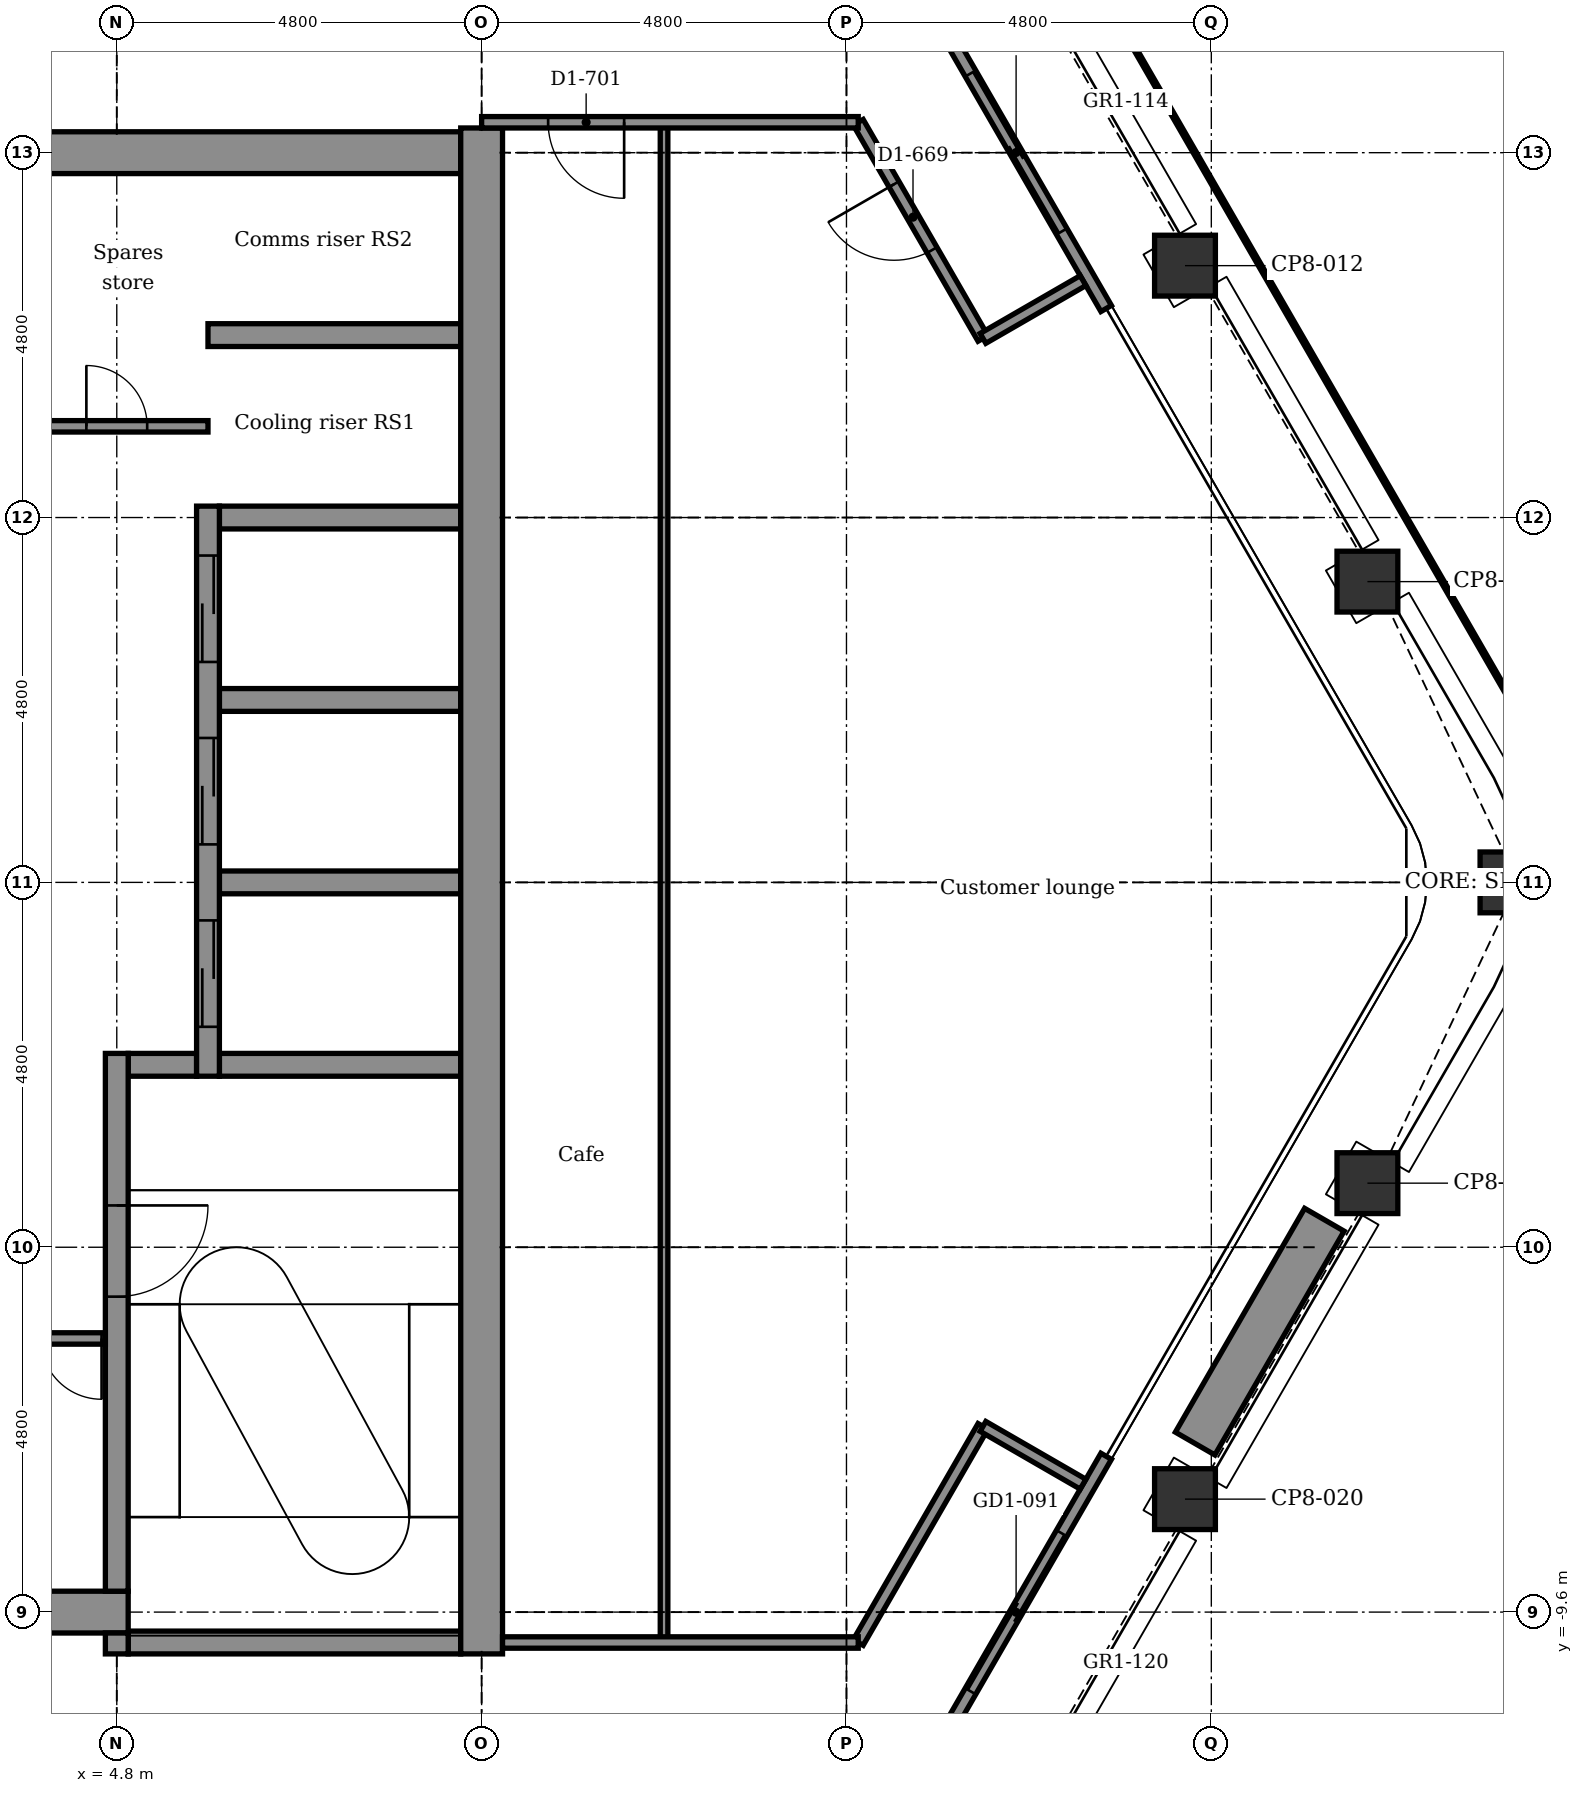
"""IFC4 building model, lengths in metres.
Left out: names, types, materials, properties, quantities, classifications, styles, units other than length and angle.
Written with IfcOpenShell. Run it as: python <this file> out.ifc"""

import sys

from ifc_helpers import new_model, si_unit, direction, frame, frame_2d, origin, origin_2d, place, context, subcontext, project, spatial, rectangle, extrude, element, fill, save


model = new_model("IFC4")
c1 = context("Model", 3, precision=1e-05, world=origin(), true_north=direction((0.0, 1.0)))
c2 = subcontext(c1, "Body", "Model", "MODEL_VIEW")
j1 = project(units=[si_unit("LENGTHUNIT", "METRE"), si_unit("PLANEANGLEUNIT", "RADIAN")], contexts=[c1])
p1 = place(None, origin())
s1 = spatial("IfcSite", under=j1, at=p1, CompositionType="ELEMENT")
p2 = place(p1, origin())
s2 = spatial("IfcBuilding", under=s1, at=p2, CompositionType="ELEMENT")
p3 = place(p2, frame((0.0, 0.0, 254.0)))
s3 = spatial("IfcBuildingStorey", under=s2, at=p3, CompositionType="ELEMENT", Elevation=254.0)
for number, where, z_axis, x_axis in (
    (1, (18.854, 8.114, -0.15), (0.0, 0.0, 1.0), (0.866, 0.5, 0.0)),
    (2, (21.254, 3.957, -0.15), (0.0, 0.0, 1.0), (0.866, 0.5, 0.0)),
    (3, (23.136, 0.0, -0.15), (0.0, 0.0, 1.0), (1.0, 0.0, 0.0)),
    (4, (21.254, -3.957, -0.15), (0.0, 0.0, 1.0), (0.5, 0.866, 0.0)),
    (5, (18.854, -8.114, -0.15), (0.0, 0.0, 1.0), (0.5, 0.866, 0.0)),
):
    element("IfcColumn", number, at=place(p3, frame(where, z_axis=z_axis, x_axis=x_axis)), inside=s3, PredefinedType="COLUMN", context=c2, shape_type="SweptSolid", body=[
        extrude(rectangle(XDim=0.8, YDim=0.8, at=origin_2d()), origin(), (0.0, 0.0, 1.0), 3.9),
    ])
p4 = place(p3, frame((4.95, -10.0, -0.15), z_axis=(0.0, 0.0, 1.0), x_axis=(1.0, 0.0, 0.0)))
e6 = element("IfcWall", 6, at=p4, inside=s3, PredefinedType="STANDARD", context=c2, shape_type="SweptSolid", body=[
    extrude(rectangle(XDim=4.375, YDim=0.3, at=frame_2d((2.188, 0.0))), origin(), (0.0, 0.0, 1.0), 3.9),
])
p5 = place(p3, frame((-5.25, -9.6, -0.15), z_axis=(0.0, 0.0, 1.0), x_axis=(1.0, 0.0, 0.0)))
e7 = element("IfcWall", 7, at=p5, inside=s3, PredefinedType="SHEAR", context=c2, shape_type="SweptSolid", body=[
    extrude(rectangle(XDim=10.2, YDim=0.55, at=frame_2d((5.1, 0.0))), origin(), (0.0, 0.0, 1.0), 3.9),
])
p6 = place(p5, frame((0.6, 0.0, 0.15)))
e8 = element("IfcOpeningElement", 8, at=p6, cuts=e7, PredefinedType="OPENING", context=c2, shape_type="SweptSolid", body=[
    extrude(rectangle(XDim=0.9, YDim=2.1, at=frame_2d((0.45, 1.05))), frame((0.0, 0.285, 0.0), z_axis=(0.0, -1.0, 0.0), x_axis=(1.0, 0.0, 0.0)), (0.0, 0.0, 1.0), 0.57),
])
p7 = place(p3, frame((4.95, -2.4, -0.15), z_axis=(0.0, 0.0, 1.0), x_axis=(1.0, 0.0, 0.0)))
e9 = element("IfcWall", 9, at=p7, inside=s3, PredefinedType="STANDARD", context=c2, shape_type="SweptSolid", body=[
    extrude(rectangle(XDim=0.9, YDim=0.3, at=frame_2d((0.45, 0.0))), origin(), (0.0, 0.0, 1.0), 3.9),
])
for number, where, z_axis, x_axis in (
    (10, (6.15, -2.4, -0.15), (0.0, 0.0, 1.0), (1.0, 0.0, 0.0)),
    (11, (6.15, 0.0, -0.15), (0.0, 0.0, 1.0), (1.0, 0.0, 0.0)),
    (12, (6.15, 2.4, -0.15), (0.0, 0.0, 1.0), (1.0, 0.0, 0.0)),
    (13, (6.15, 4.8, -0.15), (0.0, 0.0, 1.0), (1.0, 0.0, 0.0)),
):
    element("IfcWall", number, at=place(p3, frame(where, z_axis=z_axis, x_axis=x_axis)), inside=s3, PredefinedType="STANDARD", context=c2, shape_type="SweptSolid", body=[
        extrude(rectangle(XDim=3.175, YDim=0.3, at=frame_2d((1.587, 0.0))), origin(), (0.0, 0.0, 1.0), 3.9),
    ])
p8 = place(p3, frame((6.0, 7.2, -0.15), z_axis=(0.0, 0.0, 1.0), x_axis=(1.0, 0.0, 0.0)))
e14 = element("IfcWall", 14, at=p8, inside=s3, PredefinedType="STANDARD", context=c2, shape_type="SweptSolid", body=[
    extrude(rectangle(XDim=3.325, YDim=0.3, at=frame_2d((1.663, 0.0))), origin(), (0.0, 0.0, 1.0), 3.9),
])
p9 = place(p3, frame((-5.25, 9.6, -0.15), z_axis=(0.0, 0.0, 1.0), x_axis=(1.0, 0.0, 0.0)))
e15 = element("IfcWall", 15, at=p9, inside=s3, PredefinedType="SHEAR", context=c2, shape_type="SweptSolid", body=[
    extrude(rectangle(XDim=14.575, YDim=0.55, at=frame_2d((7.288, 0.0))), origin(), (0.0, 0.0, 1.0), 3.9),
])
p10 = place(p9, frame((0.6, 0.0, 0.15)))
e16 = element("IfcOpeningElement", 16, at=p10, cuts=e15, PredefinedType="OPENING", context=c2, shape_type="SweptSolid", body=[
    extrude(rectangle(XDim=0.9, YDim=2.1, at=frame_2d((0.45, 1.05))), frame((0.0, 0.285, 0.0), z_axis=(0.0, -1.0, 0.0), x_axis=(1.0, 0.0, 0.0)), (0.0, 0.0, 1.0), 0.57),
])
p11 = place(p3, frame((4.8, -10.15, -0.15), z_axis=(0.0, 0.0, 1.0), x_axis=(0.0, 1.0, 0.0)))
e17 = element("IfcWall", 17, at=p11, inside=s3, PredefinedType="STANDARD", context=c2, shape_type="SweptSolid", body=[
    extrude(rectangle(XDim=0.275, YDim=0.3, at=frame_2d((0.137, 0.0))), origin(), (0.0, 0.0, 1.0), 3.9),
])
p12 = place(p3, frame((4.8, -9.325, -0.15), z_axis=(0.0, 0.0, 1.0), x_axis=(0.0, 1.0, 0.0)))
e18 = element("IfcWall", 18, at=p12, inside=s3, PredefinedType="STANDARD", context=c2, shape_type="SweptSolid", body=[
    extrude(rectangle(XDim=7.075, YDim=0.3, at=frame_2d((3.538, 0.0))), origin(), (0.0, 0.0, 1.0), 3.9),
])
p13 = place(p12, frame((3.875, 0.0, 0.15)))
e19 = element("IfcOpeningElement", 19, at=p13, cuts=e18, PredefinedType="OPENING", context=c2, shape_type="SweptSolid", body=[
    extrude(rectangle(XDim=1.2, YDim=2.1, at=frame_2d((0.6, 1.05))), frame((0.0, 0.16, 0.0), z_axis=(0.0, -1.0, 0.0), x_axis=(1.0, 0.0, 0.0)), (0.0, 0.0, 1.0), 0.32),
])
p14 = place(p3, frame((6.0, -2.55, -0.15), z_axis=(0.0, 0.0, 1.0), x_axis=(0.0, 1.0, 0.0)))
e20 = element("IfcWall", 20, at=p14, inside=s3, PredefinedType="STANDARD", context=c2, shape_type="SweptSolid", body=[
    extrude(rectangle(XDim=7.5, YDim=0.3, at=frame_2d((3.75, 0.0))), origin(), (0.0, 0.0, 1.0), 3.9),
])
p15 = place(p14, frame((0.65, 0.0, 0.15)))
e21 = element("IfcOpeningElement", 21, at=p15, cuts=e20, PredefinedType="OPENING", context=c2, shape_type="SweptSolid", body=[
    extrude(rectangle(XDim=1.4, YDim=2.1, at=frame_2d((0.7, 1.05))), frame((0.0, 0.16, 0.0), z_axis=(0.0, -1.0, 0.0), x_axis=(1.0, 0.0, 0.0)), (0.0, 0.0, 1.0), 0.32),
])
p16 = place(p14, frame((3.05, 0.0, 0.15)))
e22 = element("IfcOpeningElement", 22, at=p16, cuts=e20, PredefinedType="OPENING", context=c2, shape_type="SweptSolid", body=[
    extrude(rectangle(XDim=1.4, YDim=2.1, at=frame_2d((0.7, 1.05))), frame((0.0, 0.16, 0.0), z_axis=(0.0, -1.0, 0.0), x_axis=(1.0, 0.0, 0.0)), (0.0, 0.0, 1.0), 0.32),
])
p17 = place(p14, frame((5.45, 0.0, 0.15)))
e23 = element("IfcOpeningElement", 23, at=p17, cuts=e20, PredefinedType="OPENING", context=c2, shape_type="SweptSolid", body=[
    extrude(rectangle(XDim=1.4, YDim=2.1, at=frame_2d((0.7, 1.05))), frame((0.0, 0.16, 0.0), z_axis=(0.0, -1.0, 0.0), x_axis=(1.0, 0.0, 0.0)), (0.0, 0.0, 1.0), 0.32),
])
p18 = place(p3, frame((9.6, -10.15, -0.15), z_axis=(0.0, 0.0, 1.0), x_axis=(0.0, 1.0, 0.0)))
e24 = element("IfcWall", 24, at=p18, inside=s3, PredefinedType="SHEAR", context=c2, shape_type="SweptSolid", body=[
    extrude(rectangle(XDim=20.075, YDim=0.55, at=frame_2d((10.038, 0.0))), origin(), (0.0, 0.0, 1.0), 3.9),
])
p19 = place(p3, frame((15.447, 11.655, 0.0), z_axis=(0.0, 0.0, 1.0), x_axis=(0.499978080042, -0.866038058908, 0.0)))
e25 = element("IfcWall", 25, at=p19, inside=s3, PredefinedType="PARTITIONING", context=c2, shape_type="SweptSolid", body=[
    extrude(rectangle(XDim=4.74, YDim=0.16, at=frame_2d((2.37, 0.0))), origin(), (0.0, 0.0, 1.0), 3.75),
])
p20 = place(p19, frame((1.17, 0.0, 0.0)))
e26 = element("IfcOpeningElement", 26, at=p20, cuts=e25, PredefinedType="OPENING", context=c2, shape_type="SweptSolid", body=[
    extrude(rectangle(XDim=2.4, YDim=2.4, at=frame_2d((1.2, 1.2))), frame((0.0, 0.09, 0.0), z_axis=(0.0, -1.0, 0.0), x_axis=(1.0, 0.0, 0.0)), (0.0, 0.0, 1.0), 0.18),
])
p21 = place(p3, frame((17.817, -7.55, 0.0), z_axis=(0.0, 0.0, 1.0), x_axis=(-0.499978080042, -0.866038058908, 0.0)))
e27 = element("IfcWall", 27, at=p21, inside=s3, PredefinedType="PARTITIONING", context=c2, shape_type="SweptSolid", body=[
    extrude(rectangle(XDim=4.74, YDim=0.16, at=frame_2d((2.37, 0.0))), origin(), (0.0, 0.0, 1.0), 3.75),
])
p22 = place(p21, frame((1.17, 0.0, 0.0)))
e28 = element("IfcOpeningElement", 28, at=p22, cuts=e27, PredefinedType="OPENING", context=c2, shape_type="SweptSolid", body=[
    extrude(rectangle(XDim=2.4, YDim=2.4, at=frame_2d((1.2, 1.2))), frame((0.0, 0.09, 0.0), z_axis=(0.0, -1.0, 0.0), x_axis=(1.0, 0.0, 0.0)), (0.0, 0.0, 1.0), 0.18),
])
p23 = place(p3, frame((20.687, -4.438, 0.0), z_axis=(0.0, 0.0, 1.0), x_axis=(-0.500008388397, -0.866020560687, 0.0)))
e29 = element("IfcWall", 29, at=p23, inside=s3, PredefinedType="USERDEFINED", context=c2, shape_type="SweptSolid", body=[
    extrude(rectangle(XDim=3.4, YDim=0.6, at=frame_2d((1.7, 0.0))), origin(), (0.0, 0.0, 1.0), 0.7),
])
p24 = place(p3, frame((12.0, -10.0, 0.0), z_axis=(0.0, 0.0, 1.0), x_axis=(0.0, 1.0, 0.0)))
e30 = element("IfcWall", 30, at=p24, inside=s3, PredefinedType="PARTITIONING", context=c2, shape_type="SweptSolid", body=[
    extrude(rectangle(XDim=20.0, YDim=0.1, at=frame_2d((10.0, 0.0))), origin(), (0.0, 0.0, 1.0), 3.75),
])
p25 = place(p3, frame((14.555, 10.0, 0.0), z_axis=(0.0, 0.0, 1.0), x_axis=(0.499954196102, -0.866051847062, 0.0)))
e31 = element("IfcWall", 31, at=p25, inside=s3, PredefinedType="PARTITIONING", context=c2, shape_type="SweptSolid", body=[
    extrude(rectangle(XDim=3.283, YDim=0.15, at=frame_2d((1.642, 0.0))), origin(), (0.0, 0.0, 1.0), 3.75),
])
p26 = place(p25, frame((0.941, 0.0, 0.0)))
e32 = element("IfcOpeningElement", 32, at=p26, cuts=e31, PredefinedType="OPENING", context=c2, shape_type="SweptSolid", body=[
    extrude(rectangle(XDim=1.0, YDim=2.1, at=frame_2d((0.5, 1.05))), frame((0.0, 0.085, 0.0), z_axis=(0.0, -1.0, 0.0), x_axis=(1.0, 0.0, 0.0)), (0.0, 0.0, 1.0), 0.17),
])
p27 = place(p3, frame((14.555, -10.0, 0.0), z_axis=(0.0, 0.0, 1.0), x_axis=(0.499954196102, 0.866051847062, 0.0)))
e33 = element("IfcWall", 33, at=p27, inside=s3, PredefinedType="PARTITIONING", context=c2, shape_type="SweptSolid", body=[
    extrude(rectangle(XDim=3.283, YDim=0.15, at=frame_2d((1.642, 0.0))), origin(), (0.0, 0.0, 1.0), 3.75),
])
for number, where, z_axis, x_axis in (
    (34, (16.196, -7.157, 0.0), (0.0, 0.0, 1.0), (0.866, -0.5, 0.0)),
    (35, (16.196, 7.157, 0.0), (0.0, 0.0, 1.0), (0.866, 0.5, 0.0)),
):
    element("IfcWall", number, at=place(p3, frame(where, z_axis=z_axis, x_axis=x_axis)), inside=s3, PredefinedType="PARTITIONING", context=c2, shape_type="SweptSolid", body=[
        extrude(rectangle(XDim=1.52, YDim=0.15, at=frame_2d((0.76, 0.0))), origin(), (0.0, 0.0, 1.0), 3.75),
    ])
p28 = place(p3, frame((9.875, -10.0, 0.0), z_axis=(0.0, 0.0, 1.0), x_axis=(1.0, 0.0, 0.0)))
e36 = element("IfcWall", 36, at=p28, inside=s3, PredefinedType="PARTITIONING", context=c2, shape_type="SweptSolid", body=[
    extrude(rectangle(XDim=4.68, YDim=0.15, at=frame_2d((2.34, 0.0))), origin(), (0.0, 0.0, 1.0), 3.75),
])
p29 = place(p3, frame((3.75, -6.0, 0.0), z_axis=(0.0, 0.0, 1.0), x_axis=(1.0, 0.0, 0.0)))
e37 = element("IfcWall", 37, at=p29, inside=s3, PredefinedType="PARTITIONING", context=c2, shape_type="SweptSolid", body=[
    extrude(rectangle(XDim=0.9, YDim=0.15, at=frame_2d((0.45, 0.0))), origin(), (0.0, 0.0, 1.0), 3.75),
])
p30 = place(p29, frame((0.05, 0.0, 0.0)))
e38 = element("IfcOpeningElement", 38, at=p30, cuts=e37, PredefinedType="OPENING", context=c2, shape_type="SweptSolid", body=[
    extrude(rectangle(XDim=0.8, YDim=2.1, at=frame_2d((0.4, 1.05))), frame((0.0, 0.085, 0.0), z_axis=(0.0, -1.0, 0.0), x_axis=(1.0, 0.0, 0.0)), (0.0, 0.0, 1.0), 0.17),
])
p31 = place(p3, frame((3.75, 6.0, 0.0), z_axis=(0.0, 0.0, 1.0), x_axis=(1.0, 0.0, 0.0)))
e39 = element("IfcWall", 39, at=p31, inside=s3, PredefinedType="PARTITIONING", context=c2, shape_type="SweptSolid", body=[
    extrude(rectangle(XDim=2.25, YDim=0.15, at=frame_2d((1.125, 0.0))), origin(), (0.0, 0.0, 1.0), 3.75),
])
p32 = place(p31, frame((0.65, 0.0, 0.0)))
e40 = element("IfcOpeningElement", 40, at=p32, cuts=e39, PredefinedType="OPENING", context=c2, shape_type="SweptSolid", body=[
    extrude(rectangle(XDim=0.8, YDim=2.1, at=frame_2d((0.4, 1.05))), frame((0.0, 0.085, 0.0), z_axis=(0.0, -1.0, 0.0), x_axis=(1.0, 0.0, 0.0)), (0.0, 0.0, 1.0), 0.17),
])
p33 = place(p3, frame((9.6, 10.0, 0.0), z_axis=(0.0, 0.0, 1.0), x_axis=(1.0, 0.0, 0.0)))
e41 = element("IfcWall", 41, at=p33, inside=s3, PredefinedType="PARTITIONING", context=c2, shape_type="SweptSolid", body=[
    extrude(rectangle(XDim=4.955, YDim=0.15, at=frame_2d((2.477, 0.0))), origin(), (0.0, 0.0, 1.0), 3.75),
])
p34 = place(p33, frame((0.875, 0.0, 0.0)))
e42 = element("IfcOpeningElement", 42, at=p34, cuts=e41, PredefinedType="OPENING", context=c2, shape_type="SweptSolid", body=[
    extrude(rectangle(XDim=1.0, YDim=2.1, at=frame_2d((0.5, 1.05))), frame((0.0, 0.085, 0.0), z_axis=(0.0, -1.0, 0.0), x_axis=(1.0, 0.0, 0.0)), (0.0, 0.0, 1.0), 0.17),
])
p35 = place(p20, origin())
e43 = element("IfcDoor", 43, at=p35, inside=s3, OperationType="DOUBLE_DOOR_SLIDING", PredefinedType="DOOR", context=c2, shape_type="SweptSolid", body=[
    extrude(rectangle(XDim=2.4, YDim=2.4, at=frame_2d((1.2, 1.2))), frame((0.0, 0.025, 0.0), z_axis=(0.0, -1.0, 0.0), x_axis=(1.0, 0.0, 0.0)), (0.0, 0.0, 1.0), 0.05),
])
fill(e26, e43)
p36 = place(p22, origin())
e44 = element("IfcDoor", 44, at=p36, inside=s3, OperationType="DOUBLE_DOOR_SLIDING", PredefinedType="DOOR", context=c2, shape_type="SweptSolid", body=[
    extrude(rectangle(XDim=2.4, YDim=2.4, at=frame_2d((1.2, 1.2))), frame((0.0, 0.025, 0.0), z_axis=(0.0, -1.0, 0.0), x_axis=(1.0, 0.0, 0.0)), (0.0, 0.0, 1.0), 0.05),
])
fill(e28, e44)
p37 = place(p32, origin())
e45 = element("IfcDoor", 45, at=p37, inside=s3, OperationType="SINGLE_SWING_LEFT", PredefinedType="DOOR", context=c2, shape_type="SweptSolid", body=[
    extrude(rectangle(XDim=0.8, YDim=2.1, at=frame_2d((0.4, 1.05))), frame((0.0, 0.025, 0.0), z_axis=(0.0, -1.0, 0.0), x_axis=(1.0, 0.0, 0.0)), (0.0, 0.0, 1.0), 0.05),
])
fill(e40, e45)
p38 = place(p30, frame((0.8, 0.0, 0.0), z_axis=(0.0, 0.0, 1.0), x_axis=(-1.0, 0.0, 0.0)))
e46 = element("IfcDoor", 46, at=p38, inside=s3, OperationType="SINGLE_SWING_RIGHT", PredefinedType="DOOR", context=c2, shape_type="SweptSolid", body=[
    extrude(rectangle(XDim=0.8, YDim=2.1, at=frame_2d((0.4, 1.05))), frame((0.0, 0.025, 0.0), z_axis=(0.0, -1.0, 0.0), x_axis=(1.0, 0.0, 0.0)), (0.0, 0.0, 1.0), 0.05),
])
fill(e38, e46)
p39 = place(p34, frame((1.0, 0.0, 0.0), z_axis=(0.0, 0.0, 1.0), x_axis=(-1.0, 0.0, 0.0)))
e47 = element("IfcDoor", 47, at=p39, inside=s3, OperationType="SINGLE_SWING_RIGHT", PredefinedType="DOOR", context=c2, shape_type="SweptSolid", body=[
    extrude(rectangle(XDim=1.0, YDim=2.1, at=frame_2d((0.5, 1.05))), frame((0.0, 0.025, 0.0), z_axis=(0.0, -1.0, 0.0), x_axis=(1.0, 0.0, 0.0)), (0.0, 0.0, 1.0), 0.05),
])
fill(e42, e47)
p40 = place(p26, frame((1.0, 0.0, 0.0), z_axis=(0.0, 0.0, 1.0), x_axis=(-1.0, 0.0, 0.0)))
e48 = element("IfcDoor", 48, at=p40, inside=s3, OperationType="SINGLE_SWING_LEFT", PredefinedType="DOOR", context=c2, shape_type="SweptSolid", body=[
    extrude(rectangle(XDim=1.0, YDim=2.1, at=frame_2d((0.5, 1.05))), frame((0.0, 0.025, 0.0), z_axis=(0.0, -1.0, 0.0), x_axis=(1.0, 0.0, 0.0)), (0.0, 0.0, 1.0), 0.05),
])
fill(e32, e48)
p41 = place(p15, origin())
e49 = element("IfcDoor", 49, at=p41, inside=s3, OperationType="DOUBLE_DOOR_SLIDING", PredefinedType="DOOR", context=c2, shape_type="SweptSolid", body=[
    extrude(rectangle(XDim=1.4, YDim=2.1, at=frame_2d((0.7, 1.05))), frame((0.0, 0.025, 0.0), z_axis=(0.0, -1.0, 0.0), x_axis=(1.0, 0.0, 0.0)), (0.0, 0.0, 1.0), 0.05),
])
fill(e21, e49)
p42 = place(p16, origin())
e50 = element("IfcDoor", 50, at=p42, inside=s3, OperationType="DOUBLE_DOOR_SLIDING", PredefinedType="DOOR", context=c2, shape_type="SweptSolid", body=[
    extrude(rectangle(XDim=1.4, YDim=2.1, at=frame_2d((0.7, 1.05))), frame((0.0, 0.025, 0.0), z_axis=(0.0, -1.0, 0.0), x_axis=(1.0, 0.0, 0.0)), (0.0, 0.0, 1.0), 0.05),
])
fill(e22, e50)
p43 = place(p17, origin())
e51 = element("IfcDoor", 51, at=p43, inside=s3, OperationType="DOUBLE_DOOR_SLIDING", PredefinedType="DOOR", context=c2, shape_type="SweptSolid", body=[
    extrude(rectangle(XDim=1.4, YDim=2.1, at=frame_2d((0.7, 1.05))), frame((0.0, 0.025, 0.0), z_axis=(0.0, -1.0, 0.0), x_axis=(1.0, 0.0, 0.0)), (0.0, 0.0, 1.0), 0.05),
])
fill(e23, e51)
p44 = place(p13, frame((1.2, 0.0, 0.0), z_axis=(0.0, 0.0, 1.0), x_axis=(-1.0, 0.0, 0.0)))
e52 = element("IfcDoor", 52, at=p44, inside=s3, OperationType="SINGLE_SWING_RIGHT", PredefinedType="DOOR", context=c2, shape_type="SweptSolid", body=[
    extrude(rectangle(XDim=1.2, YDim=2.1, at=frame_2d((0.6, 1.05))), frame((0.0, 0.025, 0.0), z_axis=(0.0, -1.0, 0.0), x_axis=(1.0, 0.0, 0.0)), (0.0, 0.0, 1.0), 0.05),
])
fill(e19, e52)
save(model, sys.argv[1])
